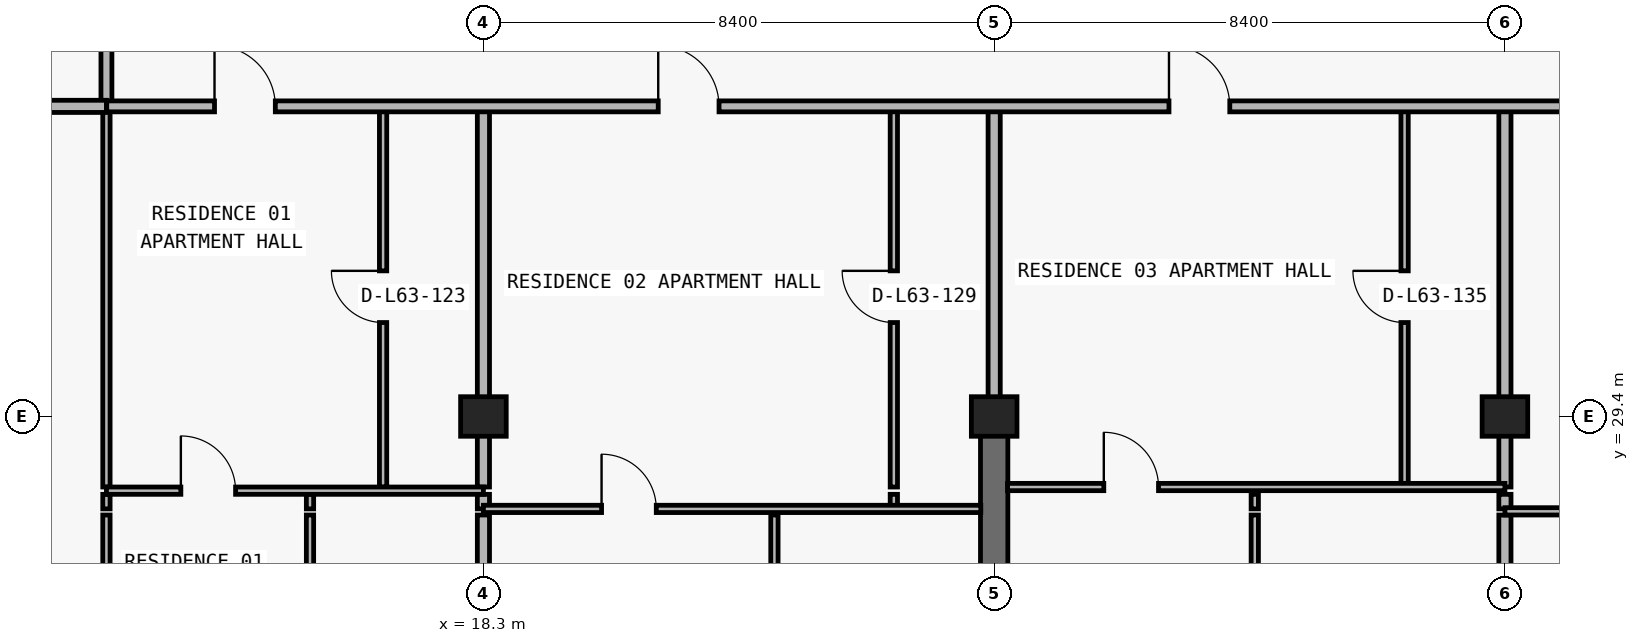
"""IFC4 building model, lengths in metres.
Left out: names, types, materials, properties, quantities, classifications, styles, units other than length and angle.
Written with IfcOpenShell. Run it as: python <this file> out.ifc"""

import sys

from ifc_helpers import new_model, si_unit, direction, frame, frame_2d, origin, origin_2d, place, context, subcontext, project, spatial, rectangle, extrude, element, fill, save


model = new_model("IFC4")
c1 = context("Model", 3, precision=1e-05, world=origin(), true_north=direction((0.0, 1.0)))
c2 = subcontext(c1, "Body", "Model", "MODEL_VIEW")
j1 = project(units=[si_unit("LENGTHUNIT", "METRE"), si_unit("PLANEANGLEUNIT", "RADIAN")], contexts=[c1])
p1 = place(None, origin())
s1 = spatial("IfcSite", under=j1, at=p1, CompositionType="ELEMENT")
p2 = place(p1, origin())
s2 = spatial("IfcBuilding", under=s1, at=p2, CompositionType="ELEMENT")
p3 = place(p2, frame((0.0, 0.0, 226.5)))
s3 = spatial("IfcBuildingStorey", under=s2, at=p3, CompositionType="ELEMENT", Elevation=226.5)
for number, where, z_axis, x_axis in (
    (1, (18.3, 29.4, 0.0), (0.0, 0.0, 1.0), (1.0, 0.0, 0.0)),
    (2, (26.7, 29.4, 0.0), (0.0, 0.0, 1.0), (1.0, 0.0, 0.0)),
    (3, (35.1, 29.4, 0.0), (0.0, 0.0, 1.0), (1.0, 0.0, 0.0)),
):
    element("IfcColumn", number, at=place(p3, frame(where, z_axis=z_axis, x_axis=x_axis)), inside=s3, PredefinedType="COLUMN", context=c2, shape_type="SweptSolid", body=[
        extrude(rectangle(XDim=0.75, YDim=0.65, at=origin_2d()), origin(), (0.0, 0.0, 1.0), 3.05),
    ])
p4 = place(p3, frame((26.7, 20.8, 0.0), z_axis=(0.0, 0.0, 1.0), x_axis=(0.0, 1.0, 0.0)))
e4 = element("IfcWall", 4, at=p4, inside=s3, PredefinedType="SHEAR", context=c2, shape_type="SweptSolid", body=[
    extrude(rectangle(XDim=8.6, YDim=0.45, at=frame_2d((4.3, 0.0))), origin(), (0.0, 0.0, 1.0), 3.05),
])
p5 = place(p3, frame((12.1, 23.09, 0.0), z_axis=(0.0, 0.0, 1.0), x_axis=(0.0, 1.0, 0.0)))
e5 = element("IfcWall", 5, at=p5, inside=s3, PredefinedType="PARTITIONING", context=c2, shape_type="SweptSolid", body=[
    extrude(rectangle(XDim=4.69, YDim=0.12, at=frame_2d((2.345, 0.0))), origin(), (0.0, 0.0, 1.0), 3.05),
])
p6 = place(p5, frame((1.895, 0.0, 0.0)))
e6 = element("IfcOpeningElement", 6, at=p6, cuts=e5, PredefinedType="OPENING", context=c2, shape_type="SweptSolid", body=[
    extrude(rectangle(XDim=0.9, YDim=2.15, at=frame_2d((0.45, 1.075))), frame((0.0, 0.07, 0.0), z_axis=(0.0, -1.0, 0.0), x_axis=(1.0, 0.0, 0.0)), (0.0, 0.0, 1.0), 0.14),
])
p7 = place(p3, frame((12.1, 27.88, 0.0), z_axis=(0.0, 0.0, 1.0), x_axis=(0.0, 1.0, 0.0)))
e7 = element("IfcWall", 7, at=p7, inside=s3, PredefinedType="PARTITIONING", context=c2, shape_type="SweptSolid", body=[
    extrude(rectangle(XDim=0.24, YDim=0.12, at=frame_2d((0.12, 0.0))), origin(), (0.0, 0.0, 1.0), 3.05),
])
p8 = place(p3, frame((12.1, 28.24, 0.0), z_axis=(0.0, 0.0, 1.0), x_axis=(0.0, 1.0, 0.0)))
e8 = element("IfcWall", 8, at=p8, inside=s3, PredefinedType="PARTITIONING", context=c2, shape_type="SweptSolid", body=[
    extrude(rectangle(XDim=6.26, YDim=0.12, at=frame_2d((3.13, 0.0))), origin(), (0.0, 0.0, 1.0), 3.05),
])
p9 = place(p3, frame((12.1, 34.505, 0.0), z_axis=(0.0, 0.0, 1.0), x_axis=(0.0, 1.0, 0.0)))
e9 = element("IfcWall", 9, at=p9, inside=s3, PredefinedType="PARTITIONING", context=c2, shape_type="SweptSolid", body=[
    extrude(rectangle(XDim=2.495, YDim=0.18, at=frame_2d((1.248, 0.0))), origin(), (0.0, 0.0, 1.0), 3.05),
])
p10 = place(p3, frame((15.448, 23.09, 0.0), z_axis=(0.0, 0.0, 1.0), x_axis=(0.0, 1.0, 0.0)))
e10 = element("IfcWall", 10, at=p10, inside=s3, PredefinedType="PARTITIONING", context=c2, shape_type="SweptSolid", body=[
    extrude(rectangle(XDim=4.69, YDim=0.12, at=frame_2d((2.345, 0.0))), origin(), (0.0, 0.0, 1.0), 3.05),
])
p11 = place(p10, frame((1.895, 0.0, 0.0)))
e11 = element("IfcOpeningElement", 11, at=p11, cuts=e10, PredefinedType="OPENING", context=c2, shape_type="SweptSolid", body=[
    extrude(rectangle(XDim=0.9, YDim=2.15, at=frame_2d((0.45, 1.075))), frame((0.0, 0.07, 0.0), z_axis=(0.0, -1.0, 0.0), x_axis=(1.0, 0.0, 0.0)), (0.0, 0.0, 1.0), 0.14),
])
p12 = place(p3, frame((15.448, 27.88, 0.0), z_axis=(0.0, 0.0, 1.0), x_axis=(0.0, 1.0, 0.0)))
e12 = element("IfcWall", 12, at=p12, inside=s3, PredefinedType="PARTITIONING", context=c2, shape_type="SweptSolid", body=[
    extrude(rectangle(XDim=0.24, YDim=0.12, at=frame_2d((0.12, 0.0))), origin(), (0.0, 0.0, 1.0), 3.05),
])
p13 = place(p3, frame((16.65, 28.24, 0.0), z_axis=(0.0, 0.0, 1.0), x_axis=(0.0, 1.0, 0.0)))
e13 = element("IfcWall", 13, at=p13, inside=s3, PredefinedType="PARTITIONING", context=c2, shape_type="SweptSolid", body=[
    extrude(rectangle(XDim=6.26, YDim=0.12, at=frame_2d((3.13, 0.0))), origin(), (0.0, 0.0, 1.0), 3.05),
])
p14 = place(p13, frame((2.705, 0.0, 0.0)))
e14 = element("IfcOpeningElement", 14, at=p14, cuts=e13, PredefinedType="OPENING", context=c2, shape_type="SweptSolid", body=[
    extrude(rectangle(XDim=0.85, YDim=2.1, at=frame_2d((0.425, 1.05))), frame((0.0, 0.07, 0.0), z_axis=(0.0, -1.0, 0.0), x_axis=(1.0, 0.0, 0.0)), (0.0, 0.0, 1.0), 0.14),
])
p15 = place(p3, frame((18.3, 23.09, 0.0), z_axis=(0.0, 0.0, 1.0), x_axis=(0.0, 1.0, 0.0)))
e15 = element("IfcWall", 15, at=p15, inside=s3, PredefinedType="PARTITIONING", context=c2, shape_type="SweptSolid", body=[
    extrude(rectangle(XDim=4.69, YDim=0.2, at=frame_2d((2.345, 0.0))), origin(), (0.0, 0.0, 1.0), 2.263),
])
p16 = place(p3, frame((18.3, 27.88, 0.0), z_axis=(0.0, 0.0, 1.0), x_axis=(0.0, 1.0, 0.0)))
e16 = element("IfcWall", 16, at=p16, inside=s3, PredefinedType="PARTITIONING", context=c2, shape_type="SweptSolid", body=[
    extrude(rectangle(XDim=0.24, YDim=0.2, at=frame_2d((0.12, 0.0))), origin(), (0.0, 0.0, 1.0), 2.263),
])
p17 = place(p3, frame((18.3, 28.24, 0.0), z_axis=(0.0, 0.0, 1.0), x_axis=(0.0, 1.0, 0.0)))
e17 = element("IfcWall", 17, at=p17, inside=s3, PredefinedType="PARTITIONING", context=c2, shape_type="SweptSolid", body=[
    extrude(rectangle(XDim=6.26, YDim=0.2, at=frame_2d((3.13, 0.0))), origin(), (0.0, 0.0, 1.0), 2.263),
])
p18 = place(p3, frame((23.086, 23.09, 0.0), z_axis=(0.0, 0.0, 1.0), x_axis=(0.0, 1.0, 0.0)))
e18 = element("IfcWall", 18, at=p18, inside=s3, PredefinedType="PARTITIONING", context=c2, shape_type="SweptSolid", body=[
    extrude(rectangle(XDim=4.69, YDim=0.12, at=frame_2d((2.345, 0.0))), origin(), (0.0, 0.0, 1.0), 3.05),
])
p19 = place(p18, frame((1.895, 0.0, 0.0)))
e19 = element("IfcOpeningElement", 19, at=p19, cuts=e18, PredefinedType="OPENING", context=c2, shape_type="SweptSolid", body=[
    extrude(rectangle(XDim=0.9, YDim=2.15, at=frame_2d((0.45, 1.075))), frame((0.0, 0.07, 0.0), z_axis=(0.0, -1.0, 0.0), x_axis=(1.0, 0.0, 0.0)), (0.0, 0.0, 1.0), 0.14),
])
p20 = place(p3, frame((25.05, 27.88, 0.0), z_axis=(0.0, 0.0, 1.0), x_axis=(0.0, 1.0, 0.0)))
e20 = element("IfcWall", 20, at=p20, inside=s3, PredefinedType="PARTITIONING", context=c2, shape_type="SweptSolid", body=[
    extrude(rectangle(XDim=0.24, YDim=0.12, at=frame_2d((0.12, 0.0))), origin(), (0.0, 0.0, 1.0), 3.05),
])
p21 = place(p3, frame((25.05, 28.24, 0.0), z_axis=(0.0, 0.0, 1.0), x_axis=(0.0, 1.0, 0.0)))
e21 = element("IfcWall", 21, at=p21, inside=s3, PredefinedType="PARTITIONING", context=c2, shape_type="SweptSolid", body=[
    extrude(rectangle(XDim=6.26, YDim=0.12, at=frame_2d((3.13, 0.0))), origin(), (0.0, 0.0, 1.0), 3.05),
])
p22 = place(p21, frame((2.705, 0.0, 0.0)))
e22 = element("IfcOpeningElement", 22, at=p22, cuts=e21, PredefinedType="OPENING", context=c2, shape_type="SweptSolid", body=[
    extrude(rectangle(XDim=0.85, YDim=2.1, at=frame_2d((0.425, 1.05))), frame((0.0, 0.07, 0.0), z_axis=(0.0, -1.0, 0.0), x_axis=(1.0, 0.0, 0.0)), (0.0, 0.0, 1.0), 0.14),
])
p23 = place(p3, frame((26.7, 29.405, 0.0), z_axis=(0.0, 0.0, 1.0), x_axis=(0.0, 1.0, 0.0)))
e23 = element("IfcWall", 23, at=p23, inside=s3, PredefinedType="PARTITIONING", context=c2, shape_type="SweptSolid", body=[
    extrude(rectangle(XDim=5.095, YDim=0.2, at=frame_2d((2.547, 0.0))), origin(), (0.0, 0.0, 1.0), 2.335),
])
p24 = place(p3, frame((30.986, 23.09, 0.0), z_axis=(0.0, 0.0, 1.0), x_axis=(0.0, 1.0, 0.0)))
e24 = element("IfcWall", 24, at=p24, inside=s3, PredefinedType="PARTITIONING", context=c2, shape_type="SweptSolid", body=[
    extrude(rectangle(XDim=4.69, YDim=0.12, at=frame_2d((2.345, 0.0))), origin(), (0.0, 0.0, 1.0), 2.629),
])
p25 = place(p24, frame((1.895, 0.0, 0.0)))
e25 = element("IfcOpeningElement", 25, at=p25, cuts=e24, PredefinedType="OPENING", context=c2, shape_type="SweptSolid", body=[
    extrude(rectangle(XDim=0.9, YDim=2.15, at=frame_2d((0.45, 1.075))), frame((0.0, 0.07, 0.0), z_axis=(0.0, -1.0, 0.0), x_axis=(1.0, 0.0, 0.0)), (0.0, 0.0, 1.0), 0.14),
])
p26 = place(p3, frame((30.986, 27.88, 0.0), z_axis=(0.0, 0.0, 1.0), x_axis=(0.0, 1.0, 0.0)))
e26 = element("IfcWall", 26, at=p26, inside=s3, PredefinedType="PARTITIONING", context=c2, shape_type="SweptSolid", body=[
    extrude(rectangle(XDim=0.24, YDim=0.12, at=frame_2d((0.12, 0.0))), origin(), (0.0, 0.0, 1.0), 2.629),
])
p27 = place(p3, frame((33.45, 28.24, 0.0), z_axis=(0.0, 0.0, 1.0), x_axis=(0.0, 1.0, 0.0)))
e27 = element("IfcWall", 27, at=p27, inside=s3, PredefinedType="PARTITIONING", context=c2, shape_type="SweptSolid", body=[
    extrude(rectangle(XDim=6.26, YDim=0.12, at=frame_2d((3.13, 0.0))), origin(), (0.0, 0.0, 1.0), 3.05),
])
p28 = place(p27, frame((2.705, 0.0, 0.0)))
e28 = element("IfcOpeningElement", 28, at=p28, cuts=e27, PredefinedType="OPENING", context=c2, shape_type="SweptSolid", body=[
    extrude(rectangle(XDim=0.85, YDim=2.1, at=frame_2d((0.425, 1.05))), frame((0.0, 0.07, 0.0), z_axis=(0.0, -1.0, 0.0), x_axis=(1.0, 0.0, 0.0)), (0.0, 0.0, 1.0), 0.14),
])
p29 = place(p3, frame((35.1, 23.09, 0.0), z_axis=(0.0, 0.0, 1.0), x_axis=(0.0, 1.0, 0.0)))
e29 = element("IfcWall", 29, at=p29, inside=s3, PredefinedType="PARTITIONING", context=c2, shape_type="SweptSolid", body=[
    extrude(rectangle(XDim=4.69, YDim=0.2, at=frame_2d((2.345, 0.0))), origin(), (0.0, 0.0, 1.0), 2.263),
])
p30 = place(p3, frame((35.1, 27.88, 0.0), z_axis=(0.0, 0.0, 1.0), x_axis=(0.0, 1.0, 0.0)))
e30 = element("IfcWall", 30, at=p30, inside=s3, PredefinedType="PARTITIONING", context=c2, shape_type="SweptSolid", body=[
    extrude(rectangle(XDim=0.24, YDim=0.2, at=frame_2d((0.12, 0.0))), origin(), (0.0, 0.0, 1.0), 2.263),
])
p31 = place(p3, frame((35.1, 28.24, 0.0), z_axis=(0.0, 0.0, 1.0), x_axis=(0.0, 1.0, 0.0)))
e31 = element("IfcWall", 31, at=p31, inside=s3, PredefinedType="PARTITIONING", context=c2, shape_type="SweptSolid", body=[
    extrude(rectangle(XDim=6.26, YDim=0.2, at=frame_2d((3.13, 0.0))), origin(), (0.0, 0.0, 1.0), 2.263),
])
p32 = place(p3, frame((35.1, 27.84, 0.0), z_axis=(0.0, 0.0, 1.0), x_axis=(1.0, 0.0, 0.0)))
e32 = element("IfcWall", 32, at=p32, inside=s3, PredefinedType="PARTITIONING", context=c2, shape_type="SweptSolid", body=[
    extrude(rectangle(XDim=4.104, YDim=0.12, at=frame_2d((2.052, 0.0))), origin(), (0.0, 0.0, 1.0), 3.05),
])
p33 = place(p32, frame((1.602, 0.0, 0.0)))
e33 = element("IfcOpeningElement", 33, at=p33, cuts=e32, PredefinedType="OPENING", context=c2, shape_type="SweptSolid", body=[
    extrude(rectangle(XDim=0.9, YDim=2.15, at=frame_2d((0.45, 1.075))), frame((0.0, 0.07, 0.0), z_axis=(0.0, -1.0, 0.0), x_axis=(1.0, 0.0, 0.0)), (0.0, 0.0, 1.0), 0.14),
])
p34 = place(p3, frame((18.3, 27.88, 0.0), z_axis=(0.0, 0.0, 1.0), x_axis=(1.0, 0.0, 0.0)))
e34 = element("IfcWall", 34, at=p34, inside=s3, PredefinedType="PARTITIONING", context=c2, shape_type="SweptSolid", body=[
    extrude(rectangle(XDim=8.18, YDim=0.12, at=frame_2d((4.09, 0.0))), origin(), (0.0, 0.0, 1.0), 3.05),
])
p35 = place(p34, frame((1.943, 0.0, 0.0)))
e35 = element("IfcOpeningElement", 35, at=p35, cuts=e34, PredefinedType="OPENING", context=c2, shape_type="SweptSolid", body=[
    extrude(rectangle(XDim=0.9, YDim=2.15, at=frame_2d((0.45, 1.075))), frame((0.0, 0.07, 0.0), z_axis=(0.0, -1.0, 0.0), x_axis=(1.0, 0.0, 0.0)), (0.0, 0.0, 1.0), 0.14),
])
p36 = place(p3, frame((12.1, 28.18, 0.0), z_axis=(0.0, 0.0, 1.0), x_axis=(1.0, 0.0, 0.0)))
e36 = element("IfcWall", 36, at=p36, inside=s3, PredefinedType="PARTITIONING", context=c2, shape_type="SweptSolid", body=[
    extrude(rectangle(XDim=6.2, YDim=0.12, at=frame_2d((3.1, 0.0))), origin(), (0.0, 0.0, 1.0), 3.05),
])
p37 = place(p36, frame((1.224, 0.0, 0.0)))
e37 = element("IfcOpeningElement", 37, at=p37, cuts=e36, PredefinedType="OPENING", context=c2, shape_type="SweptSolid", body=[
    extrude(rectangle(XDim=0.9, YDim=2.15, at=frame_2d((0.45, 1.075))), frame((0.0, 0.07, 0.0), z_axis=(0.0, -1.0, 0.0), x_axis=(1.0, 0.0, 0.0)), (0.0, 0.0, 1.0), 0.14),
])
p38 = place(p3, frame((26.92, 28.24, 0.0), z_axis=(0.0, 0.0, 1.0), x_axis=(1.0, 0.0, 0.0)))
e38 = element("IfcWall", 38, at=p38, inside=s3, PredefinedType="PARTITIONING", context=c2, shape_type="SweptSolid", body=[
    extrude(rectangle(XDim=8.18, YDim=0.12, at=frame_2d((4.09, 0.0))), origin(), (0.0, 0.0, 1.0), 3.05),
])
p39 = place(p38, frame((1.583, 0.0, 0.0)))
e39 = element("IfcOpeningElement", 39, at=p39, cuts=e38, PredefinedType="OPENING", context=c2, shape_type="SweptSolid", body=[
    extrude(rectangle(XDim=0.9, YDim=2.15, at=frame_2d((0.45, 1.075))), frame((0.0, 0.07, 0.0), z_axis=(0.0, -1.0, 0.0), x_axis=(1.0, 0.0, 0.0)), (0.0, 0.0, 1.0), 0.14),
])
p40 = place(p3, frame((8.395, 34.5, 0.0), z_axis=(0.0, 0.0, 1.0), x_axis=(1.0, 0.0, 0.0)))
e40 = element("IfcWall", 40, at=p40, inside=s3, PredefinedType="PARTITIONING", context=c2, shape_type="SweptSolid", body=[
    extrude(rectangle(XDim=3.705, YDim=0.2, at=frame_2d((1.853, 0.0))), origin(), (0.0, 0.0, 1.0), 3.05),
])
p41 = place(p3, frame((12.105, 34.5, 0.0), z_axis=(0.0, 0.0, 1.0), x_axis=(1.0, 0.0, 0.0)))
e41 = element("IfcWall", 41, at=p41, inside=s3, PredefinedType="PARTITIONING", context=c2, shape_type="SweptSolid", body=[
    extrude(rectangle(XDim=27.099, YDim=0.18, at=frame_2d((13.55, 0.0))), origin(), (0.0, 0.0, 1.0), 3.05),
])
p42 = place(p41, frame((1.772, 0.0, 0.0)))
e42 = element("IfcOpeningElement", 42, at=p42, cuts=e41, PredefinedType="OPENING", context=c2, shape_type="SweptSolid", body=[
    extrude(rectangle(XDim=1.0, YDim=2.2, at=frame_2d((0.5, 1.1))), frame((0.0, 0.1, 0.0), z_axis=(0.0, -1.0, 0.0), x_axis=(1.0, 0.0, 0.0)), (0.0, 0.0, 1.0), 0.2),
])
p43 = place(p41, frame((9.07, 0.0, 0.0)))
e43 = element("IfcOpeningElement", 43, at=p43, cuts=e41, PredefinedType="OPENING", context=c2, shape_type="SweptSolid", body=[
    extrude(rectangle(XDim=1.0, YDim=2.2, at=frame_2d((0.5, 1.1))), frame((0.0, 0.1, 0.0), z_axis=(0.0, -1.0, 0.0), x_axis=(1.0, 0.0, 0.0)), (0.0, 0.0, 1.0), 0.2),
])
p44 = place(p41, frame((17.47, 0.0, 0.0)))
e44 = element("IfcOpeningElement", 44, at=p44, cuts=e41, PredefinedType="OPENING", context=c2, shape_type="SweptSolid", body=[
    extrude(rectangle(XDim=1.0, YDim=2.2, at=frame_2d((0.5, 1.1))), frame((0.0, 0.1, 0.0), z_axis=(0.0, -1.0, 0.0), x_axis=(1.0, 0.0, 0.0)), (0.0, 0.0, 1.0), 0.2),
])
p45 = place(p41, frame((24.547, 0.0, 0.0)))
e45 = element("IfcOpeningElement", 45, at=p45, cuts=e41, PredefinedType="OPENING", context=c2, shape_type="SweptSolid", body=[
    extrude(rectangle(XDim=1.0, YDim=2.2, at=frame_2d((0.5, 1.1))), frame((0.0, 0.1, 0.0), z_axis=(0.0, -1.0, 0.0), x_axis=(1.0, 0.0, 0.0)), (0.0, 0.0, 1.0), 0.2),
])
p46 = place(p42, origin())
e46 = element("IfcDoor", 46, at=p46, inside=s3, OperationType="SINGLE_SWING_LEFT", PredefinedType="DOOR", context=c2, shape_type="SweptSolid", body=[
    extrude(rectangle(XDim=1.0, YDim=2.2, at=frame_2d((0.5, 1.1))), frame((0.0, 0.025, 0.0), z_axis=(0.0, -1.0, 0.0), x_axis=(1.0, 0.0, 0.0)), (0.0, 0.0, 1.0), 0.05),
])
fill(e42, e46)
p47 = place(p14, origin())
e47 = element("IfcDoor", 47, at=p47, inside=s3, OperationType="SINGLE_SWING_RIGHT", PredefinedType="DOOR", context=c2, shape_type="SweptSolid", body=[
    extrude(rectangle(XDim=0.85, YDim=2.1, at=frame_2d((0.425, 1.05))), frame((0.0, 0.025, 0.0), z_axis=(0.0, -1.0, 0.0), x_axis=(1.0, 0.0, 0.0)), (0.0, 0.0, 1.0), 0.05),
])
fill(e14, e47)
p48 = place(p37, origin())
e48 = element("IfcDoor", 48, at=p48, inside=s3, OperationType="SINGLE_SWING_LEFT", PredefinedType="DOOR", context=c2, shape_type="SweptSolid", body=[
    extrude(rectangle(XDim=0.9, YDim=2.15, at=frame_2d((0.45, 1.075))), frame((0.0, 0.025, 0.0), z_axis=(0.0, -1.0, 0.0), x_axis=(1.0, 0.0, 0.0)), (0.0, 0.0, 1.0), 0.05),
])
fill(e37, e48)
p49 = place(p43, origin())
e49 = element("IfcDoor", 49, at=p49, inside=s3, OperationType="SINGLE_SWING_LEFT", PredefinedType="DOOR", context=c2, shape_type="SweptSolid", body=[
    extrude(rectangle(XDim=1.0, YDim=2.2, at=frame_2d((0.5, 1.1))), frame((0.0, 0.025, 0.0), z_axis=(0.0, -1.0, 0.0), x_axis=(1.0, 0.0, 0.0)), (0.0, 0.0, 1.0), 0.05),
])
fill(e43, e49)
p50 = place(p22, origin())
e50 = element("IfcDoor", 50, at=p50, inside=s3, OperationType="SINGLE_SWING_RIGHT", PredefinedType="DOOR", context=c2, shape_type="SweptSolid", body=[
    extrude(rectangle(XDim=0.85, YDim=2.1, at=frame_2d((0.425, 1.05))), frame((0.0, 0.025, 0.0), z_axis=(0.0, -1.0, 0.0), x_axis=(1.0, 0.0, 0.0)), (0.0, 0.0, 1.0), 0.05),
])
fill(e22, e50)
p51 = place(p35, origin())
e51 = element("IfcDoor", 51, at=p51, inside=s3, OperationType="SINGLE_SWING_LEFT", PredefinedType="DOOR", context=c2, shape_type="SweptSolid", body=[
    extrude(rectangle(XDim=0.9, YDim=2.15, at=frame_2d((0.45, 1.075))), frame((0.0, 0.025, 0.0), z_axis=(0.0, -1.0, 0.0), x_axis=(1.0, 0.0, 0.0)), (0.0, 0.0, 1.0), 0.05),
])
fill(e35, e51)
p52 = place(p44, origin())
e52 = element("IfcDoor", 52, at=p52, inside=s3, OperationType="SINGLE_SWING_LEFT", PredefinedType="DOOR", context=c2, shape_type="SweptSolid", body=[
    extrude(rectangle(XDim=1.0, YDim=2.2, at=frame_2d((0.5, 1.1))), frame((0.0, 0.025, 0.0), z_axis=(0.0, -1.0, 0.0), x_axis=(1.0, 0.0, 0.0)), (0.0, 0.0, 1.0), 0.05),
])
fill(e44, e52)
p53 = place(p28, origin())
e53 = element("IfcDoor", 53, at=p53, inside=s3, OperationType="SINGLE_SWING_RIGHT", PredefinedType="DOOR", context=c2, shape_type="SweptSolid", body=[
    extrude(rectangle(XDim=0.85, YDim=2.1, at=frame_2d((0.425, 1.05))), frame((0.0, 0.025, 0.0), z_axis=(0.0, -1.0, 0.0), x_axis=(1.0, 0.0, 0.0)), (0.0, 0.0, 1.0), 0.05),
])
fill(e28, e53)
p54 = place(p39, origin())
e54 = element("IfcDoor", 54, at=p54, inside=s3, OperationType="SINGLE_SWING_LEFT", PredefinedType="DOOR", context=c2, shape_type="SweptSolid", body=[
    extrude(rectangle(XDim=0.9, YDim=2.15, at=frame_2d((0.45, 1.075))), frame((0.0, 0.025, 0.0), z_axis=(0.0, -1.0, 0.0), x_axis=(1.0, 0.0, 0.0)), (0.0, 0.0, 1.0), 0.05),
])
fill(e39, e54)
save(model, sys.argv[1])
